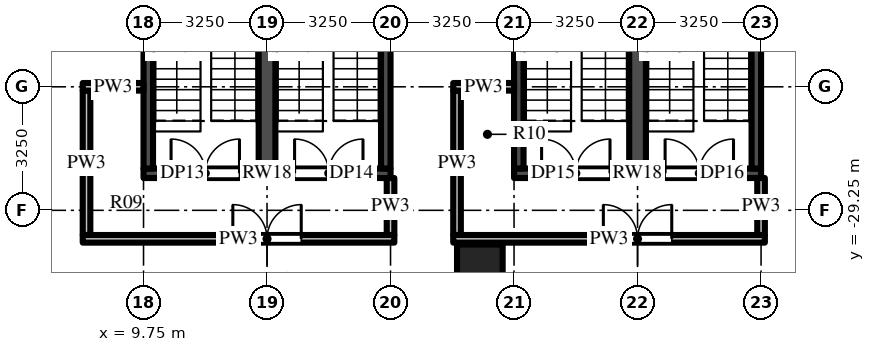
"""IFC4 building model, lengths in metres.
Left out: names, types, materials, properties, quantities, classifications, styles, units other than length and angle.
Written with IfcOpenShell. Run it as: python <this file> out.ifc"""

import sys

from ifc_helpers import new_model, si_unit, direction, frame, frame_2d, origin, origin_2d, place, context, subcontext, project, spatial, rectangle, extrude, source, transform, mapped, element, fill, save


model = new_model("IFC4")
c1 = context("Model", 3, precision=1e-05, world=origin(), true_north=direction((0.0, 1.0)))
c2 = subcontext(c1, "Body", "Model", "MODEL_VIEW")
j1 = project(units=[si_unit("LENGTHUNIT", "METRE"), si_unit("PLANEANGLEUNIT", "RADIAN")], contexts=[c1])
p1 = place(None, origin())
s1 = spatial("IfcSite", under=j1, at=p1, CompositionType="ELEMENT")
p2 = place(p1, origin())
s2 = spatial("IfcBuilding", under=s1, at=p2, CompositionType="ELEMENT")
p3 = place(p2, frame((0.0, 0.0, 8.0)))
s3 = spatial("IfcBuildingStorey", under=s2, at=p3, CompositionType="ELEMENT", Elevation=8.0)
m1 = source(origin(), c2, "Body", "SweptSolid", [
    extrude(rectangle(XDim=1.2, YDim=1.2, at=origin_2d()), origin(), (0.0, 0.0, 1.0), 6.0),
])
p4 = place(p3, frame((18.6, -30.75, 0.0), z_axis=(0.0, 0.0, 1.0), x_axis=(1.0, 0.0, 0.0)))
e1 = element("IfcColumn", 1, at=p4, inside=s3, PredefinedType="COLUMN", context=c2, shape_type="MappedRepresentation", body=[
    mapped(m1, transform((0.0, 0.0, 0.0))),
])
m2 = source(origin(), c2, "Body", "SweptSolid", [
    extrude(rectangle(XDim=6.5, YDim=0.25, at=frame_2d((3.25, 0.0))), origin(), (0.0, 0.0, 1.0), 5.7),
])
p5 = place(p3, frame((9.75, -28.275, 0.0), z_axis=(0.0, 0.0, 1.0), x_axis=(1.0, 0.0, 0.0)))
e2 = element("IfcWall", 2, at=p5, inside=s3, PredefinedType="SHEAR", context=c2, shape_type="MappedRepresentation", body=[
    mapped(m2, transform((0.0, 0.0, 0.0))),
])
m3 = source(origin(), c2, "Body", "SweptSolid", [
    extrude(rectangle(XDim=1.8, YDim=2.1, at=frame_2d((0.9, 1.05))), frame((0.0, 0.135, 0.0), z_axis=(0.0, -1.0, 0.0), x_axis=(1.0, 0.0, 0.0)), (0.0, 0.0, 1.0), 0.27),
])
p6 = place(p5, frame((0.725, 0.0, 0.0)))
e3 = element("IfcOpeningElement", 3, at=p6, cuts=e2, PredefinedType="OPENING", context=c2, shape_type="MappedRepresentation", body=[
    mapped(m3, transform((0.0, 0.0, 0.0))),
])
p7 = place(p5, frame((3.975, 0.0, 0.0)))
e4 = element("IfcOpeningElement", 4, at=p7, cuts=e2, PredefinedType="OPENING", context=c2, shape_type="MappedRepresentation", body=[
    mapped(m3, transform((0.0, 0.0, 0.0))),
])
m4 = source(origin(), c2, "Body", "SweptSolid", [
    extrude(rectangle(XDim=8.3, YDim=0.25, at=frame_2d((4.15, 0.0))), origin(), (0.0, 0.0, 1.0), 5.7),
])
for number, where, z_axis, x_axis in (
    (5, (9.875, -28.15, 0.0), (0.0, 0.0, 1.0), (0.0, 1.0, 0.0)),
    (6, (16.125, -28.15, 0.0), (0.0, 0.0, 1.0), (0.0, 1.0, 0.0)),
):
    element("IfcWall", number, at=place(p3, frame(where, z_axis=z_axis, x_axis=x_axis)), inside=s3, PredefinedType="SHEAR", context=c2, shape_type="MappedRepresentation", body=[
        mapped(m4, transform((0.0, 0.0, 0.0))),
    ])
m5 = source(origin(), c2, "Body", "SweptSolid", [
    extrude(rectangle(XDim=8.3, YDim=0.44, at=frame_2d((4.15, 0.0))), origin(), (0.0, 0.0, 1.0), 5.7),
])
p8 = place(p3, frame((13.0, -28.15, 0.0), z_axis=(0.0, 0.0, 1.0), x_axis=(0.0, 1.0, 0.0)))
e7 = element("IfcWall", 7, at=p8, inside=s3, PredefinedType="SHEAR", context=c2, shape_type="MappedRepresentation", body=[
    mapped(m5, transform((0.0, 0.0, 0.0))),
])
p9 = place(p3, frame((19.5, -28.275, 0.0), z_axis=(0.0, 0.0, 1.0), x_axis=(1.0, 0.0, 0.0)))
e8 = element("IfcWall", 8, at=p9, inside=s3, PredefinedType="SHEAR", context=c2, shape_type="MappedRepresentation", body=[
    mapped(m2, transform((0.0, 0.0, 0.0))),
])
p10 = place(p9, frame((0.725, 0.0, 0.0)))
e9 = element("IfcOpeningElement", 9, at=p10, cuts=e8, PredefinedType="OPENING", context=c2, shape_type="MappedRepresentation", body=[
    mapped(m3, transform((0.0, 0.0, 0.0))),
])
p11 = place(p9, frame((3.975, 0.0, 0.0)))
e10 = element("IfcOpeningElement", 10, at=p11, cuts=e8, PredefinedType="OPENING", context=c2, shape_type="MappedRepresentation", body=[
    mapped(m3, transform((0.0, 0.0, 0.0))),
])
for number, where, z_axis, x_axis in (
    (11, (19.625, -28.15, 0.0), (0.0, 0.0, 1.0), (0.0, 1.0, 0.0)),
    (12, (25.875, -28.15, 0.0), (0.0, 0.0, 1.0), (0.0, 1.0, 0.0)),
):
    element("IfcWall", number, at=place(p3, frame(where, z_axis=z_axis, x_axis=x_axis)), inside=s3, PredefinedType="SHEAR", context=c2, shape_type="MappedRepresentation", body=[
        mapped(m4, transform((0.0, 0.0, 0.0))),
    ])
p12 = place(p3, frame((22.75, -28.15, 0.0), z_axis=(0.0, 0.0, 1.0), x_axis=(0.0, 1.0, 0.0)))
e13 = element("IfcWall", 13, at=p12, inside=s3, PredefinedType="SHEAR", context=c2, shape_type="MappedRepresentation", body=[
    mapped(m5, transform((0.0, 0.0, 0.0))),
])
m6 = source(origin(), c2, "Body", "SweptSolid", [
    extrude(rectangle(XDim=3.8, YDim=0.2, at=frame_2d((1.9, 0.0))), origin(), (0.0, 0.0, 1.0), 5.223),
])
p13 = place(p3, frame((8.25, -29.9, 0.0), z_axis=(0.0, 0.0, 1.0), x_axis=(0.0, 1.0, 0.0)))
e14 = element("IfcWall", 14, at=p13, inside=s3, PredefinedType="PARTITIONING", context=c2, shape_type="MappedRepresentation", body=[
    mapped(m6, transform((0.0, 0.0, 0.0))),
])
m7 = source(origin(), c2, "Body", "SweptSolid", [
    extrude(rectangle(XDim=1.5, YDim=0.2, at=frame_2d((0.75, 0.0))), origin(), (0.0, 0.0, 1.0), 5.7),
])
p14 = place(p3, frame((16.25, -29.9, 0.0), z_axis=(0.0, 0.0, 1.0), x_axis=(0.0, 1.0, 0.0)))
e15 = element("IfcWall", 15, at=p14, inside=s3, PredefinedType="PARTITIONING", context=c2, shape_type="MappedRepresentation", body=[
    mapped(m7, transform((0.0, 0.0, 0.0))),
])
p15 = place(p3, frame((18.0, -29.9, 0.0), z_axis=(0.0, 0.0, 1.0), x_axis=(0.0, 1.0, 0.0)))
e16 = element("IfcWall", 16, at=p15, inside=s3, PredefinedType="PARTITIONING", context=c2, shape_type="MappedRepresentation", body=[
    mapped(m6, transform((0.0, 0.0, 0.0))),
])
p16 = place(p3, frame((26.0, -29.9, 0.0), z_axis=(0.0, 0.0, 1.0), x_axis=(0.0, 1.0, 0.0)))
e17 = element("IfcWall", 17, at=p16, inside=s3, PredefinedType="PARTITIONING", context=c2, shape_type="MappedRepresentation", body=[
    mapped(m7, transform((0.0, 0.0, 0.0))),
])
m8 = source(origin(), c2, "Body", "SweptSolid", [
    extrude(rectangle(XDim=8.2, YDim=0.2, at=frame_2d((4.1, 0.0))), origin(), (0.0, 0.0, 1.0), 5.7),
])
p17 = place(p3, frame((8.15, -30.0, 0.0), z_axis=(0.0, 0.0, 1.0), x_axis=(1.0, 0.0, 0.0)))
e18 = element("IfcWall", 18, at=p17, inside=s3, PredefinedType="PARTITIONING", context=c2, shape_type="MappedRepresentation", body=[
    mapped(m8, transform((0.0, 0.0, 0.0))),
])
m9 = source(origin(), c2, "Body", "SweptSolid", [
    extrude(rectangle(XDim=1.8, YDim=2.1, at=frame_2d((0.9, 1.05))), frame((0.0, 0.11, 0.0), z_axis=(0.0, -1.0, 0.0), x_axis=(1.0, 0.0, 0.0)), (0.0, 0.0, 1.0), 0.22),
])
p18 = place(p17, frame((3.95, 0.0, 0.0)))
e19 = element("IfcOpeningElement", 19, at=p18, cuts=e18, PredefinedType="OPENING", context=c2, shape_type="MappedRepresentation", body=[
    mapped(m9, transform((0.0, 0.0, 0.0))),
])
m10 = source(origin(), c2, "Body", "SweptSolid", [
    extrude(rectangle(XDim=8.2, YDim=0.2, at=frame_2d((4.1, 0.0))), origin(), (0.0, 0.0, 1.0), 4.839),
])
p19 = place(p3, frame((17.9, -30.0, 0.0), z_axis=(0.0, 0.0, 1.0), x_axis=(1.0, 0.0, 0.0)))
e20 = element("IfcWall", 20, at=p19, inside=s3, PredefinedType="PARTITIONING", context=c2, shape_type="MappedRepresentation", body=[
    mapped(m10, transform((0.0, 0.0, 0.0))),
])
p20 = place(p19, frame((3.95, 0.0, 0.0)))
e21 = element("IfcOpeningElement", 21, at=p20, cuts=e20, PredefinedType="OPENING", context=c2, shape_type="MappedRepresentation", body=[
    mapped(m9, transform((0.0, 0.0, 0.0))),
])
m11 = source(origin(), c2, "Body", "SweptSolid", [
    extrude(rectangle(XDim=1.6, YDim=0.2, at=frame_2d((0.8, 0.0))), origin(), (0.0, 0.0, 1.0), 5.7),
])
p21 = place(p3, frame((8.15, -26.0, 0.0), z_axis=(0.0, 0.0, 1.0), x_axis=(1.0, 0.0, 0.0)))
e22 = element("IfcWall", 22, at=p21, inside=s3, PredefinedType="PARTITIONING", context=c2, shape_type="MappedRepresentation", body=[
    mapped(m11, transform((0.0, 0.0, 0.0))),
])
m12 = source(origin(), c2, "Body", "SweptSolid", [
    extrude(rectangle(XDim=1.6, YDim=0.2, at=frame_2d((0.8, 0.0))), origin(), (0.0, 0.0, 1.0), 4.839),
])
p22 = place(p3, frame((17.9, -26.0, 0.0), z_axis=(0.0, 0.0, 1.0), x_axis=(1.0, 0.0, 0.0)))
e23 = element("IfcWall", 23, at=p22, inside=s3, PredefinedType="PARTITIONING", context=c2, shape_type="MappedRepresentation", body=[
    mapped(m12, transform((0.0, 0.0, 0.0))),
])
m13 = source(origin(), c2, "Body", "SweptSolid", [
    extrude(rectangle(XDim=1.8, YDim=2.1, at=frame_2d((0.9, 1.05))), frame((0.0, 0.025, 0.0), z_axis=(0.0, -1.0, 0.0), x_axis=(1.0, 0.0, 0.0)), (0.0, 0.0, 1.0), 0.05),
])
p23 = place(p6, origin())
e24 = element("IfcDoor", 24, at=p23, inside=s3, OperationType="DOUBLE_DOOR_SINGLE_SWING", PredefinedType="DOOR", context=c2, shape_type="MappedRepresentation", body=[
    mapped(m13, transform((0.0, 0.0, 0.0))),
])
fill(e3, e24)
p24 = place(p7, origin())
e25 = element("IfcDoor", 25, at=p24, inside=s3, OperationType="DOUBLE_DOOR_SINGLE_SWING", PredefinedType="DOOR", context=c2, shape_type="MappedRepresentation", body=[
    mapped(m13, transform((0.0, 0.0, 0.0))),
])
fill(e4, e25)
p25 = place(p10, origin())
e26 = element("IfcDoor", 26, at=p25, inside=s3, OperationType="DOUBLE_DOOR_SINGLE_SWING", PredefinedType="DOOR", context=c2, shape_type="MappedRepresentation", body=[
    mapped(m13, transform((0.0, 0.0, 0.0))),
])
fill(e9, e26)
p26 = place(p11, origin())
e27 = element("IfcDoor", 27, at=p26, inside=s3, OperationType="DOUBLE_DOOR_SINGLE_SWING", PredefinedType="DOOR", context=c2, shape_type="MappedRepresentation", body=[
    mapped(m13, transform((0.0, 0.0, 0.0))),
])
fill(e10, e27)
p27 = place(p18, origin())
e28 = element("IfcDoor", 28, at=p27, inside=s3, OperationType="DOUBLE_DOOR_SINGLE_SWING", PredefinedType="DOOR", context=c2, shape_type="MappedRepresentation", body=[
    mapped(m13, transform((0.0, 0.0, 0.0))),
])
fill(e19, e28)
p28 = place(p20, origin())
e29 = element("IfcDoor", 29, at=p28, inside=s3, OperationType="DOUBLE_DOOR_SINGLE_SWING", PredefinedType="DOOR", context=c2, shape_type="MappedRepresentation", body=[
    mapped(m13, transform((0.0, 0.0, 0.0))),
])
fill(e21, e29)
save(model, sys.argv[1])
